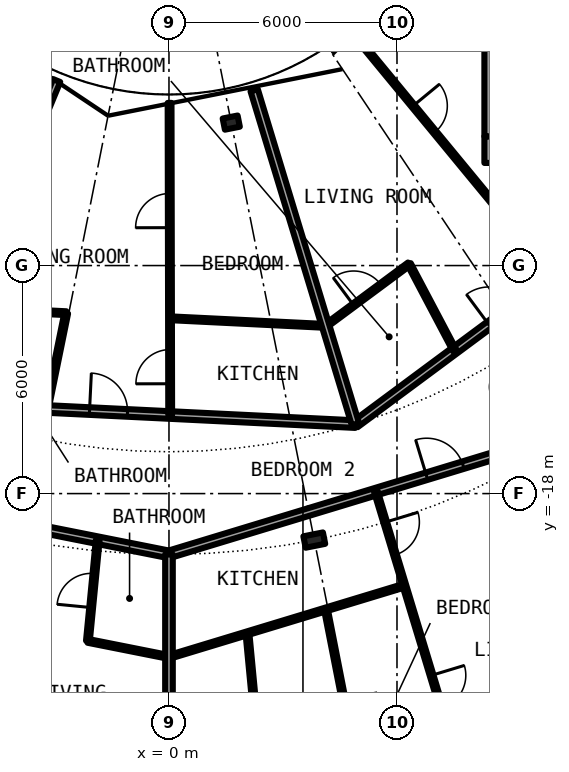
"""IFC4 building model, lengths in metres.
Left out: names, types, materials, properties, quantities, classifications, styles, units other than length and angle.
Written with IfcOpenShell. Run it as: python <this file> out.ifc"""

import sys

from ifc_helpers import new_model, si_unit, direction, frame, frame_2d, origin, origin_2d, place, context, subcontext, project, spatial, rectangle, i_section, extrude, element, fill, save


model = new_model("IFC4")
c1 = context("Model", 3, precision=1e-05, world=origin(), true_north=direction((0.0, 1.0)))
c2 = subcontext(c1, "Body", "Model", "MODEL_VIEW")
j1 = project(units=[si_unit("LENGTHUNIT", "METRE"), si_unit("PLANEANGLEUNIT", "RADIAN")], contexts=[c1])
p1 = place(None, origin())
s1 = spatial("IfcSite", under=j1, at=p1, CompositionType="ELEMENT")
p2 = place(p1, origin())
s2 = spatial("IfcBuilding", under=s1, at=p2, CompositionType="ELEMENT")
p3 = place(p2, frame((0.0, 0.0, 72.75)))
s3 = spatial("IfcBuildingStorey", under=s2, at=p3, CompositionType="ELEMENT", Elevation=72.75)
p4 = place(p3, frame((3.824, -19.223, 0.0), z_axis=(0.0, 0.0, 1.0), x_axis=(0.195090322016, -0.980785280403, 0.0)))
e1 = element("IfcColumn", 1, at=p4, inside=s3, PredefinedType="COLUMN", context=c2, shape_type="SweptSolid", body=[
    extrude(i_section(OverallWidth=0.306, OverallDepth=0.524, WebThickness=0.021, FlangeThickness=0.04, FilletRadius=0.027, at=origin_2d()), origin(), (0.0, 0.0, 1.0), 3.05),
])
p5 = place(p3, frame((1.639, -8.239, 0.0), z_axis=(0.0, 0.0, 1.0), x_axis=(0.195090322016, -0.980785280403, 0.0)))
e2 = element("IfcColumn", 2, at=p5, inside=s3, PredefinedType="COLUMN", context=c2, shape_type="SweptSolid", body=[
    extrude(i_section(OverallWidth=0.3, OverallDepth=0.4, WebThickness=0.013, FlangeThickness=0.024, FilletRadius=0.027, at=origin_2d()), origin(), (0.0, 0.0, 1.0), 3.05),
])
p6 = place(p3, frame((8.3, -8.95, 0.0), z_axis=(0.0, 0.0, 1.0), x_axis=(1.0, 0.0, 0.0)))
e3 = element("IfcWall", 3, at=p6, inside=s3, PredefinedType="SHEAR", context=c2, shape_type="SweptSolid", body=[
    extrude(rectangle(XDim=14.0, YDim=0.7, at=frame_2d((7.0, 0.0))), origin(), (0.0, 0.0, 1.0), 3.05),
])
p7 = place(p6, frame((11.575, 0.0, 0.0)))
e4 = element("IfcOpeningElement", 4, at=p7, cuts=e3, PredefinedType="OPENING", context=c2, shape_type="SweptSolid", body=[
    extrude(rectangle(XDim=1.2, YDim=2.3, at=frame_2d((0.6, 1.15))), frame((0.0, 0.36, 0.0), z_axis=(0.0, -1.0, 0.0), x_axis=(1.0, 0.0, 0.0)), (0.0, 0.0, 1.0), 0.72),
])
p8 = place(p3, frame((8.65, -8.6, 0.0), z_axis=(0.0, 0.0, 1.0), x_axis=(0.0, 1.0, 0.0)))
e5 = element("IfcWall", 5, at=p8, inside=s3, PredefinedType="SHEAR", context=c2, shape_type="SweptSolid", body=[
    extrude(rectangle(XDim=17.2, YDim=0.7, at=frame_2d((8.6, 0.0))), origin(), (0.0, 0.0, 1.0), 3.05),
])
p9 = place(p8, frame((7.4, 0.0, 0.1)))
e6 = element("IfcOpeningElement", 6, at=p9, cuts=e5, PredefinedType="OPENING", context=c2, shape_type="SweptSolid", body=[
    extrude(rectangle(XDim=2.4, YDim=2.2, at=frame_2d((1.2, 1.1))), frame((0.0, 0.36, 0.0), z_axis=(0.0, -1.0, 0.0), x_axis=(1.0, 0.0, 0.0)), (0.0, 0.0, 1.0), 0.72),
])
p10 = place(p3, frame((-2.133, -21.876, 0.0), z_axis=(0.0, 0.0, 1.0), x_axis=(0.980804550577, -0.194993419292, 0.0)))
e7 = element("IfcWall", 7, at=p10, inside=s3, PredefinedType="PARTITIONING", context=c2, shape_type="SweptSolid", body=[
    extrude(rectangle(XDim=2.175, YDim=0.1, at=frame_2d((1.087, 0.0))), origin(), (0.0, 0.0, 1.0), 2.7),
])
p11 = place(p3, frame((0.0, -22.3, 0.0), z_axis=(0.0, 0.0, 1.0), x_axis=(0.956940987612, 0.290282528286, 0.0)))
e8 = element("IfcWall", 8, at=p11, inside=s3, PredefinedType="PARTITIONING", context=c2, shape_type="SweptSolid", body=[
    extrude(rectangle(XDim=6.477, YDim=0.1, at=frame_2d((3.238, 0.0))), origin(), (0.0, 0.0, 1.0), 2.7),
])
p12 = place(p3, frame((-7.501, -18.108, 0.0), z_axis=(0.0, 0.0, 1.0), x_axis=(0.980781515054, -0.195109250749, 0.0)))
e9 = element("IfcWall", 9, at=p12, inside=s3, PredefinedType="PARTITIONING", context=c2, shape_type="SweptSolid", body=[
    extrude(rectangle(XDim=7.648, YDim=0.2, at=frame_2d((3.824, 0.0))), origin(), (0.0, 0.0, 1.0), 2.38),
])
p13 = place(p12, frame((2.25, 0.0, 0.0)))
e10 = element("IfcOpeningElement", 10, at=p13, cuts=e9, PredefinedType="OPENING", context=c2, shape_type="SweptSolid", body=[
    extrude(rectangle(XDim=1.0, YDim=2.3, at=frame_2d((0.5, 1.15))), frame((0.0, 0.11, 0.0), z_axis=(0.0, -1.0, 0.0), x_axis=(1.0, 0.0, 0.0)), (0.0, 0.0, 1.0), 0.22),
])
p14 = place(p3, frame((0.0, -19.6, 0.0), z_axis=(0.0, 0.0, 1.0), x_axis=(0.956932298225, 0.290311172044, 0.0)))
e11 = element("IfcWall", 11, at=p14, inside=s3, PredefinedType="PARTITIONING", context=c2, shape_type="SweptSolid", body=[
    extrude(rectangle(XDim=11.219, YDim=0.2, at=frame_2d((5.61, 0.0))), origin(), (0.0, 0.0, 1.0), 2.38),
])
p15 = place(p14, frame((7.086, 0.0, 0.0)))
e12 = element("IfcOpeningElement", 12, at=p15, cuts=e11, PredefinedType="OPENING", context=c2, shape_type="SweptSolid", body=[
    extrude(rectangle(XDim=1.0, YDim=2.3, at=frame_2d((0.5, 1.15))), frame((0.0, 0.11, 0.0), z_axis=(0.0, -1.0, 0.0), x_axis=(1.0, 0.0, 0.0)), (0.0, 0.0, 1.0), 0.22),
])
p16 = place(p3, frame((-6.469, -15.614, 0.0), z_axis=(0.0, 0.0, 1.0), x_axis=(0.998798520108, -0.049005267363, 0.0)))
e13 = element("IfcWall", 13, at=p16, inside=s3, PredefinedType="PARTITIONING", context=c2, shape_type="SweptSolid", body=[
    extrude(rectangle(XDim=11.389, YDim=0.2, at=frame_2d((5.694, 0.0))), origin(), (0.0, 0.0, 1.0), 2.7),
])
p17 = place(p16, frame((4.383, 0.0, 0.0)))
e14 = element("IfcOpeningElement", 14, at=p17, cuts=e13, PredefinedType="OPENING", context=c2, shape_type="SweptSolid", body=[
    extrude(rectangle(XDim=1.0, YDim=2.3, at=frame_2d((0.5, 1.15))), frame((0.0, 0.11, 0.0), z_axis=(0.0, -1.0, 0.0), x_axis=(1.0, 0.0, 0.0)), (0.0, 0.0, 1.0), 0.22),
])
p18 = place(p3, frame((4.906, -16.172, 0.0), z_axis=(0.0, 0.0, 1.0), x_axis=(0.803204584823, 0.59570327758, 0.0)))
e15 = element("IfcWall", 15, at=p18, inside=s3, PredefinedType="PARTITIONING", context=c2, shape_type="SweptSolid", body=[
    extrude(rectangle(XDim=11.387, YDim=0.2, at=frame_2d((5.693, 0.0))), origin(), (0.0, 0.0, 1.0), 2.7),
])
p19 = place(p18, frame((4.38, 0.0, 0.0)))
e16 = element("IfcOpeningElement", 16, at=p19, cuts=e15, PredefinedType="OPENING", context=c2, shape_type="SweptSolid", body=[
    extrude(rectangle(XDim=1.0, YDim=2.3, at=frame_2d((0.5, 1.15))), frame((0.0, 0.11, 0.0), z_axis=(0.0, -1.0, 0.0), x_axis=(1.0, 0.0, 0.0)), (0.0, 0.0, 1.0), 0.22),
])
p20 = place(p3, frame((-5.434, -13.119, 0.0), z_axis=(0.0, 0.0, 1.0), x_axis=(0.998796928508, -0.049037695739, 0.0)))
e17 = element("IfcWall", 17, at=p20, inside=s3, PredefinedType="PARTITIONING", context=c2, shape_type="SweptSolid", body=[
    extrude(rectangle(XDim=2.733, YDim=0.1, at=frame_2d((1.367, 0.0))), origin(), (0.0, 0.0, 1.0), 2.7),
])
p21 = place(p20, frame((0.917, 0.0, 0.0)))
e18 = element("IfcOpeningElement", 18, at=p21, cuts=e17, PredefinedType="OPENING", context=c2, shape_type="SweptSolid", body=[
    extrude(rectangle(XDim=0.9, YDim=2.3, at=frame_2d((0.45, 1.15))), frame((0.0, 0.06, 0.0), z_axis=(0.0, -1.0, 0.0), x_axis=(1.0, 0.0, 0.0)), (0.0, 0.0, 1.0), 0.12),
])
p22 = place(p3, frame((0.03, -13.387, 0.0), z_axis=(0.0, 0.0, 1.0), x_axis=(0.998798386358, -0.049007993321, 0.0)))
e19 = element("IfcWall", 19, at=p22, inside=s3, PredefinedType="PARTITIONING", context=c2, shape_type="SweptSolid", body=[
    extrude(rectangle(XDim=4.1, YDim=0.1, at=frame_2d((2.05, 0.0))), origin(), (0.0, 0.0, 1.0), 2.7),
])
p23 = place(p3, frame((4.123, -13.589, 0.0), z_axis=(0.0, 0.0, 1.0), x_axis=(0.803128348509, 0.595806055542, 0.0)))
e20 = element("IfcWall", 20, at=p23, inside=s3, PredefinedType="PARTITIONING", context=c2, shape_type="SweptSolid", body=[
    extrude(rectangle(XDim=2.734, YDim=0.1, at=frame_2d((1.367, 0.0))), origin(), (0.0, 0.0, 1.0), 2.7),
])
p24 = place(p23, frame((0.916, 0.0, 0.0)))
e21 = element("IfcOpeningElement", 21, at=p24, cuts=e20, PredefinedType="OPENING", context=c2, shape_type="SweptSolid", body=[
    extrude(rectangle(XDim=0.9, YDim=2.3, at=frame_2d((0.45, 1.15))), frame((0.0, 0.06, 0.0), z_axis=(0.0, -1.0, 0.0), x_axis=(1.0, 0.0, 0.0)), (0.0, 0.0, 1.0), 0.12),
])
p25 = place(p3, frame((-6.467, -15.614, 0.0), z_axis=(0.0, 0.0, 1.0), x_axis=(0.382646942224, 0.923894646378, 0.0)))
e22 = element("IfcWall", 22, at=p25, inside=s3, PredefinedType="PARTITIONING", context=c2, shape_type="SweptSolid", body=[
    extrude(rectangle(XDim=9.181, YDim=0.2, at=frame_2d((4.59, 0.0))), origin(), (0.0, 0.0, 1.0), 2.7),
])
p26 = place(p3, frame((-3.218, -15.773, 0.0), z_axis=(0.0, 0.0, 1.0), x_axis=(0.199820523641, 0.979832515449, 0.0)))
e23 = element("IfcWall", 23, at=p26, inside=s3, PredefinedType="PARTITIONING", context=c2, shape_type="SweptSolid", body=[
    extrude(rectangle(XDim=2.572, YDim=0.1, at=frame_2d((1.286, 0.0))), origin(), (0.0, 0.0, 1.0), 2.7),
])
p27 = place(p3, frame((-2.133, -21.876, 0.0), z_axis=(0.0, 0.0, 1.0), x_axis=(0.096960338807, 0.995288246036, 0.0)))
e24 = element("IfcWall", 24, at=p27, inside=s3, PredefinedType="PARTITIONING", context=c2, shape_type="SweptSolid", body=[
    extrude(rectangle(XDim=2.661, YDim=0.1, at=frame_2d((1.331, 0.0))), origin(), (0.0, 0.0, 1.0), 2.7),
])
p28 = place(p27, frame((0.881, 0.0, 0.0)))
e25 = element("IfcOpeningElement", 25, at=p28, cuts=e24, PredefinedType="OPENING", context=c2, shape_type="SweptSolid", body=[
    extrude(rectangle(XDim=0.9, YDim=2.3, at=frame_2d((0.45, 1.15))), frame((0.0, 0.06, 0.0), z_axis=(0.0, -1.0, 0.0), x_axis=(1.0, 0.0, 0.0)), (0.0, 0.0, 1.0), 0.12),
])
p29 = place(p3, frame((0.0, -27.175, 0.0), z_axis=(0.0, 0.0, 1.0), x_axis=(0.0, 1.0, 0.0)))
e26 = element("IfcWall", 26, at=p29, inside=s3, PredefinedType="PARTITIONING", context=c2, shape_type="SweptSolid", body=[
    extrude(rectangle(XDim=7.575, YDim=0.2, at=frame_2d((3.788, 0.0))), origin(), (0.0, 0.0, 1.0), 2.7),
])
p30 = place(p3, frame((0.032, -15.933, 0.0), z_axis=(0.0, 0.0, 1.0), x_axis=(-0.0019321625, 0.999998133372, 0.0)))
e27 = element("IfcWall", 27, at=p30, inside=s3, PredefinedType="PARTITIONING", context=c2, shape_type="SweptSolid", body=[
    extrude(rectangle(XDim=8.213, YDim=0.1, at=frame_2d((4.106, 0.0))), origin(), (0.0, 0.0, 1.0), 2.7),
])
p31 = place(p30, frame((0.823, 0.0, 0.0)))
e28 = element("IfcOpeningElement", 28, at=p31, cuts=e27, PredefinedType="OPENING", context=c2, shape_type="SweptSolid", body=[
    extrude(rectangle(XDim=0.9, YDim=2.3, at=frame_2d((0.45, 1.15))), frame((0.0, 0.06, 0.0), z_axis=(0.0, -1.0, 0.0), x_axis=(1.0, 0.0, 0.0)), (0.0, 0.0, 1.0), 0.12),
])
p32 = place(p30, frame((4.93, 0.0, 0.0)))
e29 = element("IfcOpeningElement", 29, at=p32, cuts=e27, PredefinedType="OPENING", context=c2, shape_type="SweptSolid", body=[
    extrude(rectangle(XDim=0.9, YDim=2.3, at=frame_2d((0.45, 1.15))), frame((0.0, 0.06, 0.0), z_axis=(0.0, -1.0, 0.0), x_axis=(1.0, 0.0, 0.0)), (0.0, 0.0, 1.0), 0.12),
])
p33 = place(p3, frame((2.065, -21.674, 0.0), z_axis=(0.0, 0.0, 1.0), x_axis=(0.094751520537, -0.99550095397, 0.0)))
e30 = element("IfcWall", 30, at=p33, inside=s3, PredefinedType="PARTITIONING", context=c2, shape_type="SweptSolid", body=[
    extrude(rectangle(XDim=5.403, YDim=0.1, at=frame_2d((2.702, 0.0))), origin(), (0.0, 0.0, 1.0), 2.7),
])
p34 = place(p33, frame((2.252, 0.0, 0.0)))
e31 = element("IfcOpeningElement", 31, at=p34, cuts=e30, PredefinedType="OPENING", context=c2, shape_type="SweptSolid", body=[
    extrude(rectangle(XDim=0.9, YDim=2.3, at=frame_2d((0.45, 1.15))), frame((0.0, 0.06, 0.0), z_axis=(0.0, -1.0, 0.0), x_axis=(1.0, 0.0, 0.0)), (0.0, 0.0, 1.0), 0.12),
])
p35 = place(p3, frame((2.242, -7.388, 0.0), z_axis=(0.0, 0.0, 1.0), x_axis=(0.290225889812, -0.956958166736, 0.0)))
e32 = element("IfcWall", 32, at=p35, inside=s3, PredefinedType="PARTITIONING", context=c2, shape_type="SweptSolid", body=[
    extrude(rectangle(XDim=9.179, YDim=0.2, at=frame_2d((4.59, 0.0))), origin(), (0.0, 0.0, 1.0), 2.7),
])
p36 = place(p3, frame((4.13, -21.047, 0.0), z_axis=(0.0, 0.0, 1.0), x_axis=(0.192433779325, -0.981309961518, 0.0)))
e33 = element("IfcWall", 33, at=p36, inside=s3, PredefinedType="PARTITIONING", context=c2, shape_type="SweptSolid", body=[
    extrude(rectangle(XDim=5.727, YDim=0.1, at=frame_2d((2.863, 0.0))), origin(), (0.0, 0.0, 1.0), 2.7),
])
p37 = place(p36, frame((2.414, 0.0, 0.0)))
e34 = element("IfcOpeningElement", 34, at=p37, cuts=e33, PredefinedType="OPENING", context=c2, shape_type="SweptSolid", body=[
    extrude(rectangle(XDim=0.9, YDim=2.3, at=frame_2d((0.45, 1.15))), frame((0.0, 0.06, 0.0), z_axis=(0.0, -1.0, 0.0), x_axis=(1.0, 0.0, 0.0)), (0.0, 0.0, 1.0), 0.12),
])
p38 = place(p3, frame((4.908, -5.959, 0.0), z_axis=(0.0, 0.0, 1.0), x_axis=(0.636105207978, -0.771602335652, 0.0)))
e35 = element("IfcWall", 35, at=p38, inside=s3, PredefinedType="PARTITIONING", context=c2, shape_type="SweptSolid", body=[
    extrude(rectangle(XDim=8.213, YDim=0.1, at=frame_2d((4.106, 0.0))), origin(), (0.0, 0.0, 1.0), 2.7),
])
p39 = place(p38, frame((6.49, 0.0, 0.0)))
e36 = element("IfcOpeningElement", 36, at=p39, cuts=e35, PredefinedType="OPENING", context=c2, shape_type="SweptSolid", body=[
    extrude(rectangle(XDim=0.9, YDim=2.3, at=frame_2d((0.45, 1.15))), frame((0.0, 0.06, 0.0), z_axis=(0.0, -1.0, 0.0), x_axis=(1.0, 0.0, 0.0)), (0.0, 0.0, 1.0), 0.12),
])
p40 = place(p38, frame((2.384, 0.0, 0.0)))
e37 = element("IfcOpeningElement", 37, at=p40, cuts=e35, PredefinedType="OPENING", context=c2, shape_type="SweptSolid", body=[
    extrude(rectangle(XDim=0.9, YDim=2.3, at=frame_2d((0.45, 1.15))), frame((0.0, 0.06, 0.0), z_axis=(0.0, -1.0, 0.0), x_axis=(1.0, 0.0, 0.0)), (0.0, 0.0, 1.0), 0.12),
])
p41 = place(p3, frame((5.445, -17.948, 0.0), z_axis=(0.0, 0.0, 1.0), x_axis=(0.290158700753, -0.956978541231, 0.0)))
e38 = element("IfcWall", 38, at=p41, inside=s3, PredefinedType="PARTITIONING", context=c2, shape_type="SweptSolid", body=[
    extrude(rectangle(XDim=8.419, YDim=0.1, at=frame_2d((4.209, 0.0))), origin(), (0.0, 0.0, 1.0), 2.7),
])
p42 = place(p41, frame((0.842, 0.0, 0.0)))
e39 = element("IfcOpeningElement", 39, at=p42, cuts=e38, PredefinedType="OPENING", context=c2, shape_type="SweptSolid", body=[
    extrude(rectangle(XDim=0.9, YDim=2.3, at=frame_2d((0.45, 1.15))), frame((0.0, 0.06, 0.0), z_axis=(0.0, -1.0, 0.0), x_axis=(1.0, 0.0, 0.0)), (0.0, 0.0, 1.0), 0.12),
])
p43 = place(p41, frame((5.052, 0.0, 0.0)))
e40 = element("IfcOpeningElement", 40, at=p43, cuts=e38, PredefinedType="OPENING", context=c2, shape_type="SweptSolid", body=[
    extrude(rectangle(XDim=0.9, YDim=2.3, at=frame_2d((0.45, 1.15))), frame((0.0, 0.06, 0.0), z_axis=(0.0, -1.0, 0.0), x_axis=(1.0, 0.0, 0.0)), (0.0, 0.0, 1.0), 0.12),
])
p44 = place(p3, frame((6.318, -11.96, 0.0), z_axis=(0.0, 0.0, 1.0), x_axis=(0.467001992543, -0.884256263173, 0.0)))
e41 = element("IfcWall", 41, at=p44, inside=s3, PredefinedType="PARTITIONING", context=c2, shape_type="SweptSolid", body=[
    extrude(rectangle(XDim=2.572, YDim=0.1, at=frame_2d((1.286, 0.0))), origin(), (0.0, 0.0, 1.0), 2.7),
])
p45 = place(p28, origin())
e42 = element("IfcDoor", 42, at=p45, inside=s3, OperationType="SINGLE_SWING_LEFT", PredefinedType="DOOR", context=c2, shape_type="SweptSolid", body=[
    extrude(rectangle(XDim=0.9, YDim=2.3, at=frame_2d((0.45, 1.15))), frame((0.0, 0.025, 0.0), z_axis=(0.0, -1.0, 0.0), x_axis=(1.0, 0.0, 0.0)), (0.0, 0.0, 1.0), 0.05),
])
fill(e25, e42)
p46 = place(p15, origin())
e43 = element("IfcDoor", 43, at=p46, inside=s3, OperationType="SINGLE_SWING_RIGHT", PredefinedType="DOOR", context=c2, shape_type="SweptSolid", body=[
    extrude(rectangle(XDim=1.0, YDim=2.3, at=frame_2d((0.5, 1.15))), frame((0.0, 0.025, 0.0), z_axis=(0.0, -1.0, 0.0), x_axis=(1.0, 0.0, 0.0)), (0.0, 0.0, 1.0), 0.05),
])
fill(e12, e43)
p47 = place(p42, origin())
e44 = element("IfcDoor", 44, at=p47, inside=s3, OperationType="SINGLE_SWING_LEFT", PredefinedType="DOOR", context=c2, shape_type="SweptSolid", body=[
    extrude(rectangle(XDim=0.9, YDim=2.3, at=frame_2d((0.45, 1.15))), frame((0.0, 0.025, 0.0), z_axis=(0.0, -1.0, 0.0), x_axis=(1.0, 0.0, 0.0)), (0.0, 0.0, 1.0), 0.05),
])
fill(e39, e44)
p48 = place(p43, origin())
e45 = element("IfcDoor", 45, at=p48, inside=s3, OperationType="SINGLE_SWING_RIGHT", PredefinedType="DOOR", context=c2, shape_type="SweptSolid", body=[
    extrude(rectangle(XDim=0.9, YDim=2.3, at=frame_2d((0.45, 1.15))), frame((0.0, 0.025, 0.0), z_axis=(0.0, -1.0, 0.0), x_axis=(1.0, 0.0, 0.0)), (0.0, 0.0, 1.0), 0.05),
])
fill(e40, e45)
p49 = place(p17, origin())
e46 = element("IfcDoor", 46, at=p49, inside=s3, OperationType="SINGLE_SWING_LEFT", PredefinedType="DOOR", context=c2, shape_type="SweptSolid", body=[
    extrude(rectangle(XDim=1.0, YDim=2.3, at=frame_2d((0.5, 1.15))), frame((0.0, 0.025, 0.0), z_axis=(0.0, -1.0, 0.0), x_axis=(1.0, 0.0, 0.0)), (0.0, 0.0, 1.0), 0.05),
])
fill(e14, e46)
p50 = place(p31, origin())
e47 = element("IfcDoor", 47, at=p50, inside=s3, OperationType="SINGLE_SWING_LEFT", PredefinedType="DOOR", context=c2, shape_type="SweptSolid", body=[
    extrude(rectangle(XDim=0.9, YDim=2.3, at=frame_2d((0.45, 1.15))), frame((0.0, 0.025, 0.0), z_axis=(0.0, -1.0, 0.0), x_axis=(1.0, 0.0, 0.0)), (0.0, 0.0, 1.0), 0.05),
])
fill(e28, e47)
p51 = place(p32, origin())
e48 = element("IfcDoor", 48, at=p51, inside=s3, OperationType="SINGLE_SWING_RIGHT", PredefinedType="DOOR", context=c2, shape_type="SweptSolid", body=[
    extrude(rectangle(XDim=0.9, YDim=2.3, at=frame_2d((0.45, 1.15))), frame((0.0, 0.025, 0.0), z_axis=(0.0, -1.0, 0.0), x_axis=(1.0, 0.0, 0.0)), (0.0, 0.0, 1.0), 0.05),
])
fill(e29, e48)
p52 = place(p19, origin())
e49 = element("IfcDoor", 49, at=p52, inside=s3, OperationType="SINGLE_SWING_LEFT", PredefinedType="DOOR", context=c2, shape_type="SweptSolid", body=[
    extrude(rectangle(XDim=1.0, YDim=2.3, at=frame_2d((0.5, 1.15))), frame((0.0, 0.025, 0.0), z_axis=(0.0, -1.0, 0.0), x_axis=(1.0, 0.0, 0.0)), (0.0, 0.0, 1.0), 0.05),
])
fill(e16, e49)
p53 = place(p24, origin())
e50 = element("IfcDoor", 50, at=p53, inside=s3, OperationType="SINGLE_SWING_LEFT", PredefinedType="DOOR", context=c2, shape_type="SweptSolid", body=[
    extrude(rectangle(XDim=0.9, YDim=2.3, at=frame_2d((0.45, 1.15))), frame((0.0, 0.025, 0.0), z_axis=(0.0, -1.0, 0.0), x_axis=(1.0, 0.0, 0.0)), (0.0, 0.0, 1.0), 0.05),
])
fill(e21, e50)
p54 = place(p40, origin())
e51 = element("IfcDoor", 51, at=p54, inside=s3, OperationType="SINGLE_SWING_LEFT", PredefinedType="DOOR", context=c2, shape_type="SweptSolid", body=[
    extrude(rectangle(XDim=0.9, YDim=2.3, at=frame_2d((0.45, 1.15))), frame((0.0, 0.025, 0.0), z_axis=(0.0, -1.0, 0.0), x_axis=(1.0, 0.0, 0.0)), (0.0, 0.0, 1.0), 0.05),
])
fill(e37, e51)
save(model, sys.argv[1])
